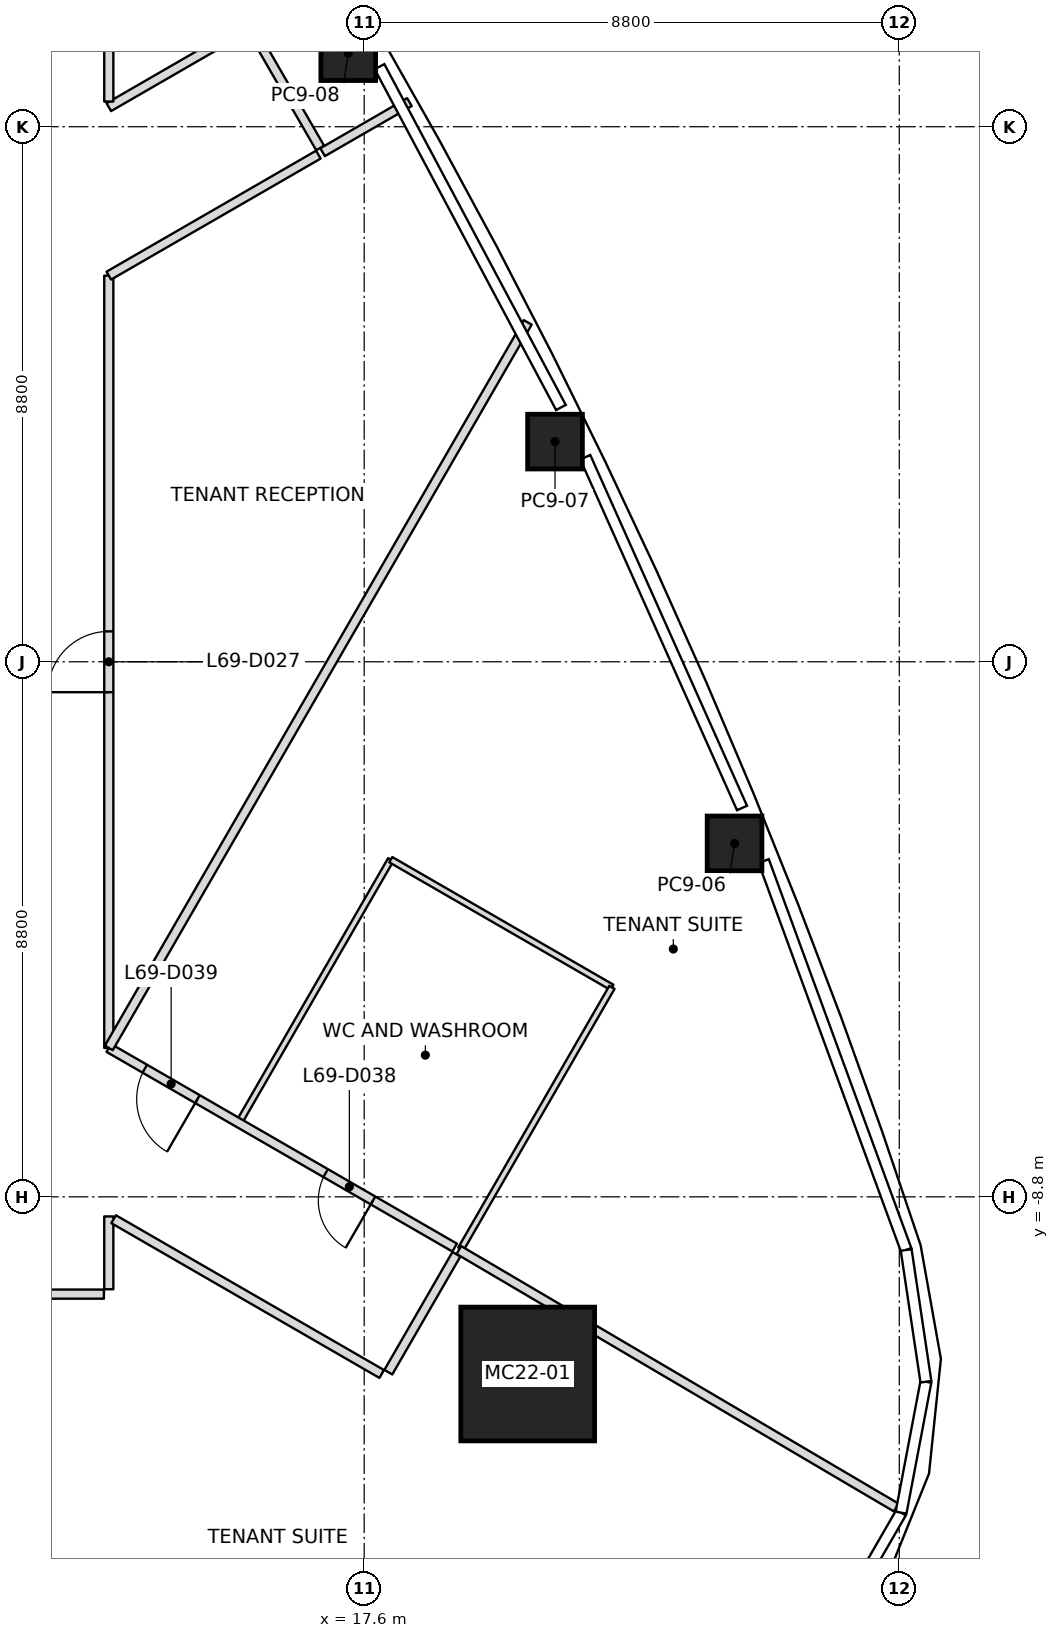
"""IFC4 building model, lengths in metres.
Left out: names, types, materials, properties, quantities, classifications, styles, units other than length and angle.
Written with IfcOpenShell. Run it as: python <this file> out.ifc"""

import sys

from ifc_helpers import new_model, si_unit, direction, frame, frame_2d, origin, origin_2d, place, context, subcontext, project, spatial, rectangle, extrude, element, fill, save


model = new_model("IFC4")
c1 = context("Model", 3, precision=1e-05, world=origin(), true_north=direction((0.0, 1.0)))
c2 = subcontext(c1, "Body", "Model", "MODEL_VIEW")
j1 = project(units=[si_unit("LENGTHUNIT", "METRE"), si_unit("PLANEANGLEUNIT", "RADIAN")], contexts=[c1])
p1 = place(None, origin())
s1 = spatial("IfcSite", under=j1, at=p1, CompositionType="ELEMENT")
p2 = place(p1, origin())
s2 = spatial("IfcBuilding", under=s1, at=p2, CompositionType="ELEMENT")
p3 = place(p2, frame((0.0, 0.0, 303.0)))
s3 = spatial("IfcBuildingStorey", under=s2, at=p3, CompositionType="ELEMENT", Elevation=303.0)
p4 = place(p3, frame((20.289, -11.714, 0.0), z_axis=(-0.027756720281, 0.01604399436, 0.999485945236), x_axis=(0.999614708015, 0.000445500311, 0.027753144871)))
e1 = element("IfcColumn", 1, at=p4, inside=s3, PredefinedType="COLUMN", context=c2, shape_type="SweptSolid", body=[
    extrude(rectangle(XDim=2.2, YDim=2.2, at=origin_2d()), origin(), (0.0, 0.0, 1.0), 4.002),
])
p5 = place(p3, frame((23.691, -2.987, 0.0), z_axis=(-0.017696558482, 0.009885663704, 0.999794531627), x_axis=(-0.376141094999, 0.926427367608, -0.015818002387)))
e2 = element("IfcColumn", 2, at=p5, inside=s3, PredefinedType="COLUMN", context=c2, shape_type="SweptSolid", body=[
    extrude(rectangle(XDim=0.9, YDim=0.9, at=origin_2d()), origin(), (0.0, 0.0, 1.0), 4.001),
])
p6 = place(p3, frame((20.738, 3.621, 0.0), z_axis=(-0.013975659066, 0.001952930525, 0.999900428551), x_axis=(-0.439099892743, 0.898403584297, -0.007892015999)))
e3 = element("IfcColumn", 3, at=p6, inside=s3, PredefinedType="COLUMN", context=c2, shape_type="SweptSolid", body=[
    extrude(rectangle(XDim=0.9, YDim=0.9, at=origin_2d()), origin(), (0.0, 0.0, 1.0), 4.0),
])
p7 = place(p3, frame((17.338, 10.01, 0.0), z_axis=(-0.009948074445, -0.005736926367, 0.999934059571), x_axis=(-0.499975258342, 0.8660396879, -5.385525e-06)))
e4 = element("IfcColumn", 4, at=p7, inside=s3, PredefinedType="COLUMN", context=c2, shape_type="SweptSolid", body=[
    extrude(rectangle(XDim=0.9, YDim=0.9, at=origin_2d()), origin(), (0.0, 0.0, 1.0), 4.0),
])
p8 = place(p3, frame((20.289, 5.582, 0.0), z_axis=(0.0, 0.0, 1.0), x_axis=(-0.500005690942, -0.866022118093, 0.0)))
e5 = element("IfcWall", 5, at=p8, inside=s3, PredefinedType="PARTITIONING", context=c2, shape_type="SweptSolid", body=[
    extrude(rectangle(XDim=13.779, YDim=0.15, at=frame_2d((6.889, 0.0))), origin(), (0.0, 0.0, 1.0), 3.084),
])
p9 = place(p3, frame((16.916, 8.381, 0.0), z_axis=(0.0, 0.0, 1.0), x_axis=(0.866047486323, 0.49996174997, 0.0)))
e6 = element("IfcWall", 6, at=p9, inside=s3, PredefinedType="PARTITIONING", context=c2, shape_type="SweptSolid", body=[
    extrude(rectangle(XDim=1.649, YDim=0.15, at=frame_2d((0.824, 0.0))), origin(), (0.0, 0.0, 1.0), 3.084),
])
p10 = place(p3, frame((19.157, -9.675, 0.0), z_axis=(0.0, 0.0, 1.0), x_axis=(0.861729621709, -0.507367774962, 0.0)))
e7 = element("IfcWall", 7, at=p10, inside=s3, PredefinedType="PARTITIONING", context=c2, shape_type="SweptSolid", body=[
    extrude(rectangle(XDim=8.347, YDim=0.15, at=frame_2d((4.173, 0.0))), origin(), (0.0, 0.0, 1.0), 3.234),
])
p11 = place(p3, frame((1.2, -10.4, 0.0), z_axis=(0.0, 0.0, 1.0), x_axis=(1.0, 0.0, 0.0)))
e8 = element("IfcWall", 8, at=p11, inside=s3, PredefinedType="PARTITIONING", context=c2, shape_type="SweptSolid", body=[
    extrude(rectangle(XDim=12.12, YDim=0.15, at=frame_2d((6.06, 0.0))), origin(), (0.0, 0.0, 1.0), 3.3),
])
p12 = place(p11, frame((2.05, 0.0, 0.0)))
e9 = element("IfcOpeningElement", 9, at=p12, cuts=e8, PredefinedType="OPENING", context=c2, shape_type="SweptSolid", body=[
    extrude(rectangle(XDim=0.9, YDim=2.1, at=frame_2d((0.45, 1.05))), frame((0.0, 0.075, 0.0), z_axis=(0.0, -1.0, 0.0), x_axis=(1.0, 0.0, 0.0)), (0.0, 0.0, 1.0), 0.15),
])
p13 = place(p11, frame((8.15, 0.0, 0.0)))
e10 = element("IfcOpeningElement", 10, at=p13, cuts=e8, PredefinedType="OPENING", context=c2, shape_type="SweptSolid", body=[
    extrude(rectangle(XDim=1.0, YDim=2.1, at=frame_2d((0.5, 1.05))), frame((0.0, 0.075, 0.0), z_axis=(0.0, -1.0, 0.0), x_axis=(1.0, 0.0, 0.0)), (0.0, 0.0, 1.0), 0.15),
])
p14 = place(p3, frame((13.4, -10.32, 0.0), z_axis=(0.0, 0.0, 1.0), x_axis=(0.0, 1.0, 0.0)))
e11 = element("IfcWall", 11, at=p14, inside=s3, PredefinedType="PARTITIONING", context=c2, shape_type="SweptSolid", body=[
    extrude(rectangle(XDim=1.198, YDim=0.15, at=frame_2d((0.599, 0.0))), origin(), (0.0, 0.0, 1.0), 3.233),
])
p15 = place(p3, frame((13.479, -9.168, 0.0), z_axis=(0.0, 0.0, 1.0), x_axis=(0.866029844103, -0.499992309064, 0.0)))
e12 = element("IfcWall", 12, at=p15, inside=s3, PredefinedType="PARTITIONING", context=c2, shape_type="SweptSolid", body=[
    extrude(rectangle(XDim=5.09, YDim=0.15, at=frame_2d((2.545, 0.0))), origin(), (0.0, 0.0, 1.0), 3.233),
])
p16 = place(p3, frame((13.4, -6.351, 0.0), z_axis=(0.0, 0.0, 1.0), x_axis=(0.0, 1.0, 0.0)))
e13 = element("IfcWall", 13, at=p16, inside=s3, PredefinedType="PARTITIONING", context=c2, shape_type="SweptSolid", body=[
    extrude(rectangle(XDim=12.702, YDim=0.15, at=frame_2d((6.351, 0.0))), origin(), (0.0, 0.0, 1.0), 3.293),
])
p17 = place(p16, frame((5.851, 0.0, 0.0)))
e14 = element("IfcOpeningElement", 14, at=p17, cuts=e13, PredefinedType="OPENING", context=c2, shape_type="SweptSolid", body=[
    extrude(rectangle(XDim=1.0, YDim=2.1, at=frame_2d((0.5, 1.05))), frame((0.0, 0.075, 0.0), z_axis=(0.0, -1.0, 0.0), x_axis=(1.0, 0.0, 0.0)), (0.0, 0.0, 1.0), 0.15),
])
p18 = place(p3, frame((13.4, 6.351, 0.0), z_axis=(0.0, 0.0, 1.0), x_axis=(0.866026229868, 0.499998569178, 0.0)))
e15 = element("IfcWall", 15, at=p18, inside=s3, PredefinedType="PARTITIONING", context=c2, shape_type="SweptSolid", body=[
    extrude(rectangle(XDim=3.98, YDim=0.15, at=frame_2d((1.99, 0.0))), origin(), (0.0, 0.0, 1.0), 3.3),
])
p19 = place(p3, frame((19.088, -9.635, 0.0), z_axis=(0.0, 0.0, 1.0), x_axis=(-0.866027119138, 0.499997028909, 0.0)))
e16 = element("IfcWall", 16, at=p19, inside=s3, PredefinedType="PARTITIONING", context=c2, shape_type="SweptSolid", body=[
    extrude(rectangle(XDim=6.568, YDim=0.15, at=frame_2d((3.284, 0.0))), origin(), (0.0, 0.0, 1.0), 3.3),
])
p20 = place(p19, frame((1.55, 0.0, 0.0)))
e17 = element("IfcOpeningElement", 17, at=p20, cuts=e16, PredefinedType="OPENING", context=c2, shape_type="SweptSolid", body=[
    extrude(rectangle(XDim=0.9, YDim=2.1, at=frame_2d((0.45, 1.05))), frame((0.0, 0.075, 0.0), z_axis=(0.0, -1.0, 0.0), x_axis=(1.0, 0.0, 0.0)), (0.0, 0.0, 1.0), 0.15),
])
p21 = place(p19, frame((4.884, 0.0, 0.0)))
e18 = element("IfcOpeningElement", 18, at=p21, cuts=e16, PredefinedType="OPENING", context=c2, shape_type="SweptSolid", body=[
    extrude(rectangle(XDim=1.0, YDim=2.1, at=frame_2d((0.5, 1.05))), frame((0.0, 0.075, 0.0), z_axis=(0.0, -1.0, 0.0), x_axis=(1.0, 0.0, 0.0)), (0.0, 0.0, 1.0), 0.15),
])
p22 = place(p3, frame((15.613, 10.4, 0.0), z_axis=(0.0, 0.0, 1.0), x_axis=(-0.866036056452, -0.499981548585, 0.0)))
e19 = element("IfcWall", 19, at=p22, inside=s3, PredefinedType="PARTITIONING", context=c2, shape_type="SweptSolid", body=[
    extrude(rectangle(XDim=2.556, YDim=0.15, at=frame_2d((1.278, 0.0))), origin(), (0.0, 0.0, 1.0), 3.3),
])
p23 = place(p3, frame((13.4, 9.214, 0.0), z_axis=(0.0, 0.0, 1.0), x_axis=(0.0, 1.0, 0.0)))
e20 = element("IfcWall", 20, at=p23, inside=s3, PredefinedType="PARTITIONING", context=c2, shape_type="SweptSolid", body=[
    extrude(rectangle(XDim=1.106, YDim=0.15, at=frame_2d((0.553, 0.0))), origin(), (0.0, 0.0, 1.0), 3.3),
])
p24 = place(p3, frame((16.876, 8.45, 0.0), z_axis=(0.0, 0.0, 1.0), x_axis=(-0.500077830873, 0.865980463445, 0.0)))
e21 = element("IfcWall", 21, at=p24, inside=s3, PredefinedType="PARTITIONING", context=c2, shape_type="SweptSolid", body=[
    extrude(rectangle(XDim=2.24, YDim=0.15, at=frame_2d((1.12, 0.0))), origin(), (0.0, 0.0, 1.0), 3.3),
])
p25 = place(p3, frame((17.997, -11.684, 0.0), z_axis=(0.0, 0.0, 1.0), x_axis=(0.500030632641, 0.866007717299, 0.0)))
e22 = element("IfcWall", 22, at=p25, inside=s3, PredefinedType="PARTITIONING", context=c2, shape_type="SweptSolid", body=[
    extrude(rectangle(XDim=2.24, YDim=0.15, at=frame_2d((1.12, 0.0))), origin(), (0.0, 0.0, 1.0), 3.233),
])
p26 = place(p3, frame((15.552, -7.559, 0.0), z_axis=(0.0, 0.0, 1.0), x_axis=(0.500011595943, 0.86601870876, 0.0)))
e23 = element("IfcWall", 23, at=p26, inside=s3, PredefinedType="PARTITIONING", context=c2, shape_type="SweptSolid", body=[
    extrude(rectangle(XDim=4.97, YDim=0.1, at=frame_2d((2.485, 0.0))), origin(), (0.0, 0.0, 1.0), 3.3),
])
p27 = place(p3, frame((18.037, -3.255, 0.0), z_axis=(0.0, 0.0, 1.0), x_axis=(0.866034573852, -0.49998411664, 0.0)))
e24 = element("IfcWall", 24, at=p27, inside=s3, PredefinedType="PARTITIONING", context=c2, shape_type="SweptSolid", body=[
    extrude(rectangle(XDim=4.2, YDim=0.1, at=frame_2d((2.1, 0.0))), origin(), (0.0, 0.0, 1.0), 3.3),
])
p28 = place(p3, frame((21.674, -5.354, 0.0), z_axis=(0.0, 0.0, 1.0), x_axis=(-0.499974753747, -0.866039979225, 0.0)))
e25 = element("IfcWall", 25, at=p28, inside=s3, PredefinedType="PARTITIONING", context=c2, shape_type="SweptSolid", body=[
    extrude(rectangle(XDim=4.97, YDim=0.1, at=frame_2d((2.485, 0.0))), origin(), (0.0, 0.0, 1.0), 3.3),
])
p29 = place(p17, origin())
e26 = element("IfcDoor", 26, at=p29, inside=s3, OperationType="SINGLE_SWING_RIGHT", PredefinedType="DOOR", context=c2, shape_type="SweptSolid", body=[
    extrude(rectangle(XDim=1.0, YDim=2.1, at=frame_2d((0.5, 1.05))), frame((0.0, 0.025, 0.0), z_axis=(0.0, -1.0, 0.0), x_axis=(1.0, 0.0, 0.0)), (0.0, 0.0, 1.0), 0.05),
])
fill(e14, e26)
p30 = place(p20, origin())
e27 = element("IfcDoor", 27, at=p30, inside=s3, OperationType="SINGLE_SWING_RIGHT", PredefinedType="DOOR", context=c2, shape_type="SweptSolid", body=[
    extrude(rectangle(XDim=0.9, YDim=2.1, at=frame_2d((0.45, 1.05))), frame((0.0, 0.025, 0.0), z_axis=(0.0, -1.0, 0.0), x_axis=(1.0, 0.0, 0.0)), (0.0, 0.0, 1.0), 0.05),
])
fill(e17, e27)
p31 = place(p21, origin())
e28 = element("IfcDoor", 28, at=p31, inside=s3, OperationType="SINGLE_SWING_LEFT", PredefinedType="DOOR", context=c2, shape_type="SweptSolid", body=[
    extrude(rectangle(XDim=1.0, YDim=2.1, at=frame_2d((0.5, 1.05))), frame((0.0, 0.025, 0.0), z_axis=(0.0, -1.0, 0.0), x_axis=(1.0, 0.0, 0.0)), (0.0, 0.0, 1.0), 0.05),
])
fill(e18, e28)
save(model, sys.argv[1])
